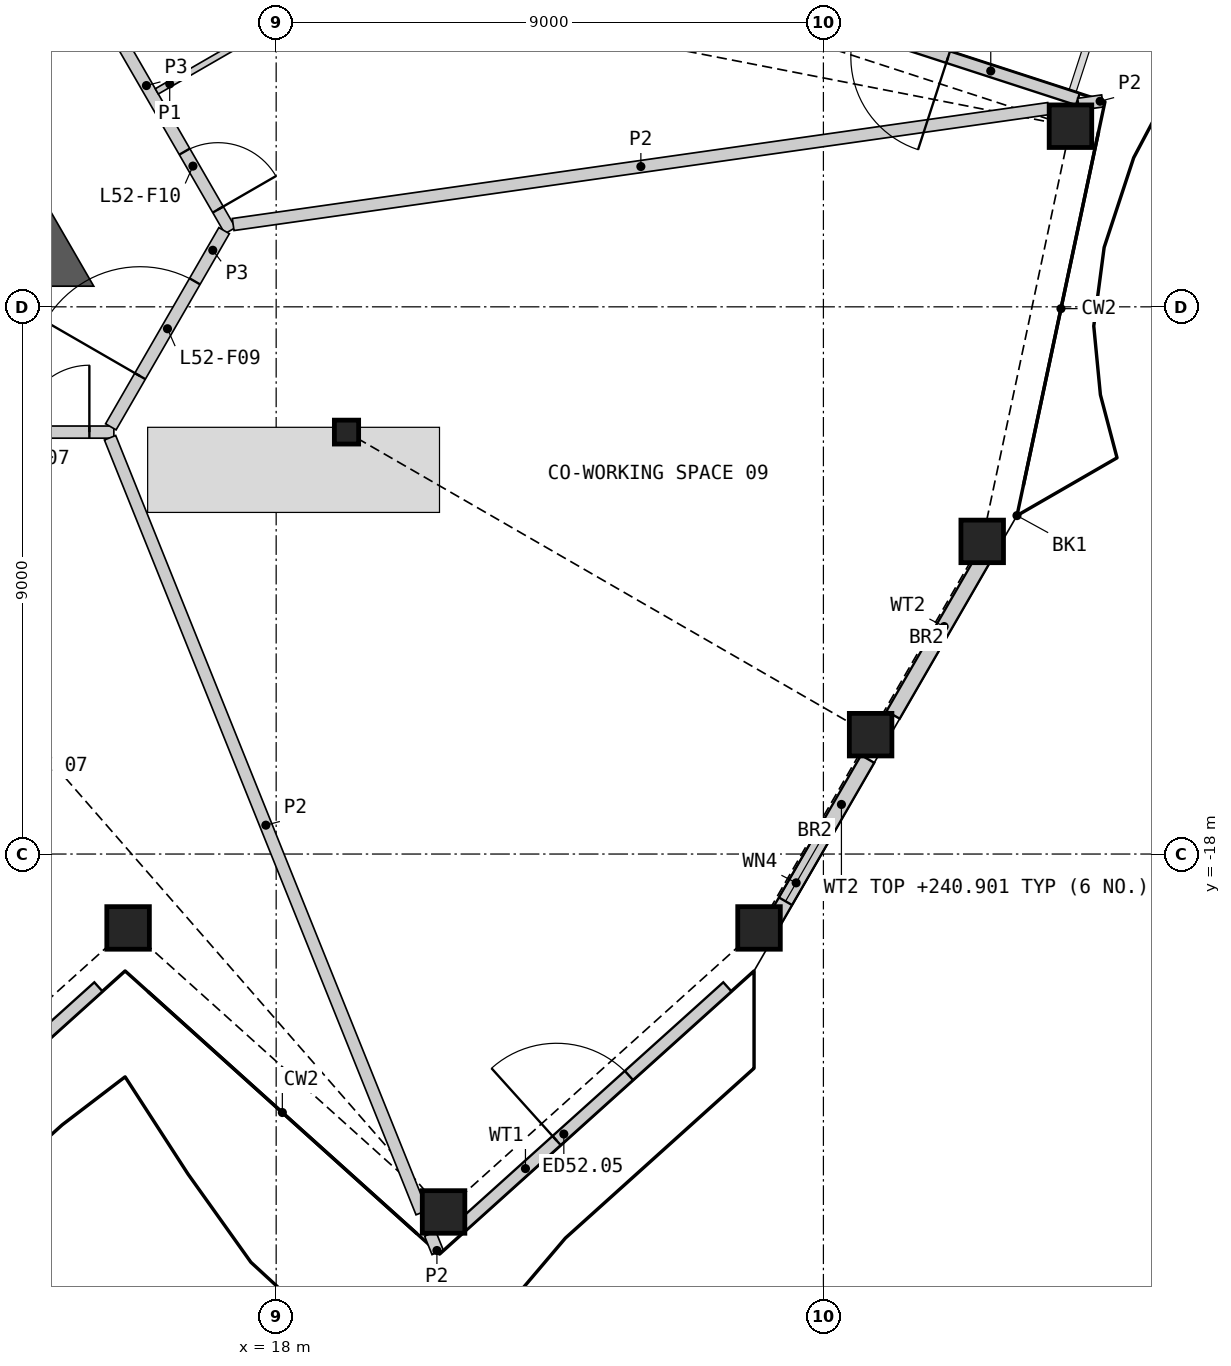
"""IFC4 building model, lengths in metres.
Left out: names, types, materials, properties, quantities, classifications, styles, units other than length and angle.
Written with IfcOpenShell. Run it as: python <this file> out.ifc"""

import sys

from ifc_helpers import new_model, si_unit, direction, frame, frame_2d, origin, origin_2d, place, context, subcontext, project, spatial, polyline, rectangle, hollow_rectangle, i_section, outline, extrude, element, fill, save


model = new_model("IFC4")
c1 = context("Model", 3, precision=1e-05, world=origin(), true_north=direction((0.0, 1.0)))
c2 = subcontext(c1, "Body", "Model", "MODEL_VIEW")
j1 = project(units=[si_unit("LENGTHUNIT", "METRE"), si_unit("PLANEANGLEUNIT", "RADIAN")], contexts=[c1])
p1 = place(None, origin())
s1 = spatial("IfcSite", under=j1, at=p1, CompositionType="ELEMENT")
p2 = place(p1, origin())
s2 = spatial("IfcBuilding", under=s1, at=p2, CompositionType="ELEMENT")
p3 = place(p2, frame((0.0, 0.0, 238.2)))
s3 = spatial("IfcBuildingStorey", under=s2, at=p3, CompositionType="ELEMENT", Elevation=238.2)
for number, where, z_axis, x_axis in (
    (1, (15.565, -19.215, 0.0), (0.0, 0.0, 1.0), (1.0, 0.0, 0.0)),
    (2, (20.753, -23.887, 0.0), (0.0, 0.0, 1.0), (1.0, 0.0, 0.0)),
    (3, (25.941, -19.215, 0.0), (0.0, 0.0, 1.0), (1.0, 0.0, 0.0)),
    (4, (27.776, -16.037, 0.0), (0.0, 0.0, 1.0), (1.0, 0.0, 0.0)),
    (5, (29.612, -12.858, 0.0), (0.0, 0.0, 1.0), (1.0, 0.0, 0.0)),
    (6, (31.063, -6.029, 0.0), (0.0, 0.0, 1.0), (1.0, 0.0, 0.0)),
):
    element("IfcColumn", number, at=place(p3, frame(where, z_axis=z_axis, x_axis=x_axis)), inside=s3, PredefinedType="COLUMN", context=c2, shape_type="SweptSolid", body=[
        extrude(hollow_rectangle(XDim=0.7, YDim=0.7, WallThickness=0.045, at=origin_2d()), origin(), (0.0, 0.0, 1.0), 3.6),
    ])
p4 = place(p3, frame((19.157, -11.06, 0.0), z_axis=(0.0, 0.0, 1.0), x_axis=(1.0, 0.0, 0.0)))
e7 = element("IfcColumn", 7, at=p4, inside=s3, PredefinedType="COLUMN", context=c2, shape_type="SweptSolid", body=[
    extrude(i_section(OverallWidth=0.399, OverallDepth=0.393, WebThickness=0.023, FlangeThickness=0.037, at=origin_2d()), origin(), (0.0, 0.0, 1.0), 3.6),
])
p5 = place(p3, frame((10.649, -24.17, 0.0), z_axis=(0.0, 0.0, 1.0), x_axis=(0.743143336638, 0.669132259878, 0.0)))
e8 = element("IfcWall", 8, at=p5, inside=s3, PredefinedType="SOLIDWALL", context=c2, shape_type="SweptSolid", body=[
    extrude(rectangle(XDim=5.958, YDim=0.2, at=frame_2d((2.979, 0.0))), origin(), (0.0, 0.0, 1.0), 2.701),
])
p6 = place(p5, frame((2.179, 0.0, 0.0)))
e9 = element("IfcOpeningElement", 9, at=p6, cuts=e8, PredefinedType="OPENING", context=c2, shape_type="SweptSolid", body=[
    extrude(rectangle(XDim=1.6, YDim=2.4, at=frame_2d((0.8, 1.2))), frame((0.0, 0.11, 0.0), z_axis=(0.0, -1.0, 0.0), x_axis=(1.0, 0.0, 0.0)), (0.0, 0.0, 1.0), 0.22),
])
p7 = place(p3, frame((20.993, -24.17, 0.0), z_axis=(0.0, 0.0, 1.0), x_axis=(0.743143336638, 0.669132259878, 0.0)))
e10 = element("IfcWall", 10, at=p7, inside=s3, PredefinedType="SOLIDWALL", context=c2, shape_type="SweptSolid", body=[
    extrude(rectangle(XDim=5.958, YDim=0.2, at=frame_2d((2.979, 0.0))), origin(), (0.0, 0.0, 1.0), 2.701),
])
p8 = place(p7, frame((2.179, 0.0, 0.0)))
e11 = element("IfcOpeningElement", 11, at=p8, cuts=e10, PredefinedType="OPENING", context=c2, shape_type="SweptSolid", body=[
    extrude(rectangle(XDim=1.6, YDim=2.4, at=frame_2d((0.8, 1.2))), frame((0.0, 0.11, 0.0), z_axis=(0.0, -1.0, 0.0), x_axis=(1.0, 0.0, 0.0)), (0.0, 0.0, 1.0), 0.22),
])
p9 = place(p3, frame((26.002, -19.427, 0.0), z_axis=(0.0, 0.0, 1.0), x_axis=(0.499987726745, 0.866032489635, 0.0)))
e12 = element("IfcWall", 12, at=p9, inside=s3, PredefinedType="SOLIDWALL", context=c2, shape_type="SweptSolid", body=[
    extrude(rectangle(XDim=3.452, YDim=0.25, at=frame_2d((1.726, 0.0))), origin(), (0.0, 0.0, 1.0), 2.701),
])
p10 = place(p9, frame((0.75, 0.0, 1.8)))
e13 = element("IfcOpeningElement", 13, at=p10, cuts=e12, PredefinedType="OPENING", context=c2, shape_type="SweptSolid", body=[
    extrude(rectangle(XDim=1.4, YDim=0.7, at=frame_2d((0.7, 0.35))), frame((0.0, 0.135, 0.0), z_axis=(0.0, -1.0, 0.0), x_axis=(1.0, 0.0, 0.0)), (0.0, 0.0, 1.0), 0.27),
])
p11 = place(p3, frame((28.146, -15.712, 0.0), z_axis=(0.0, 0.0, 1.0), x_axis=(0.500003693016, 0.86602327161, 0.0)))
e14 = element("IfcWall", 14, at=p11, inside=s3, PredefinedType="SOLIDWALL", context=c2, shape_type="SweptSolid", body=[
    extrude(rectangle(XDim=3.356, YDim=0.25, at=frame_2d((1.678, 0.0))), origin(), (0.0, 0.0, 1.0), 2.701),
])
p12 = place(p3, frame((31.184, -5.586, 0.0), z_axis=(0.0, 0.0, 1.0), x_axis=(-0.95106415783, 0.30899347516, 0.0)))
e15 = element("IfcWall", 15, at=p12, inside=s3, PredefinedType="SOLIDWALL", context=c2, shape_type="SweptSolid", body=[
    extrude(rectangle(XDim=6.021, YDim=0.2, at=frame_2d((3.011, 0.0))), origin(), (0.0, 0.0, 1.0), 2.701),
])
p13 = place(p12, frame((2.243, 0.0, 0.0)))
e16 = element("IfcOpeningElement", 16, at=p13, cuts=e15, PredefinedType="OPENING", context=c2, shape_type="SweptSolid", body=[
    extrude(rectangle(XDim=1.6, YDim=2.4, at=frame_2d((0.8, 1.2))), frame((0.0, 0.11, 0.0), z_axis=(0.0, -1.0, 0.0), x_axis=(1.0, 0.0, 0.0)), (0.0, 0.0, 1.0), 0.22),
])
p14 = place(p3, origin())
e17 = element("IfcWall", 17, at=p14, inside=s3, PredefinedType="SHEAR", context=c2, shape_type="SweptSolid", body=[
    extrude(outline(polyline([(12.748, -8.66), (12.748, -7.36), (13.874, -6.71), (15.0, -8.66), (12.748, -8.66)])), origin(), (0.0, 0.0, 1.0), 3.25),
])
p15 = place(p3, frame((9.788, -11.06, 0.0), z_axis=(0.0, 0.0, 1.0), x_axis=(1.0, 0.0, 0.0)))
e18 = element("IfcWall", 18, at=p15, inside=s3, PredefinedType="PARTITIONING", context=c2, shape_type="SweptSolid", body=[
    extrude(rectangle(XDim=5.543, YDim=0.2, at=frame_2d((2.771, 0.0))), origin(), (0.0, 0.0, 1.0), 3.25),
])
p16 = place(p15, frame((4.04, 0.0, 0.0)))
e19 = element("IfcOpeningElement", 19, at=p16, cuts=e18, PredefinedType="OPENING", context=c2, shape_type="SweptSolid", body=[
    extrude(rectangle(XDim=1.1, YDim=2.1, at=frame_2d((0.55, 1.05))), frame((0.0, 0.11, 0.0), z_axis=(0.0, -1.0, 0.0), x_axis=(1.0, 0.0, 0.0)), (0.0, 0.0, 1.0), 0.22),
])
p17 = place(p3, frame((14.489, -2.975, 0.0), z_axis=(0.0, 0.0, 1.0), x_axis=(0.500017753321, -0.866015153657, 0.0)))
e20 = element("IfcWall", 20, at=p17, inside=s3, PredefinedType="PARTITIONING", context=c2, shape_type="SweptSolid", body=[
    extrude(rectangle(XDim=5.51, YDim=0.2, at=frame_2d((2.755, 0.0))), origin(), (0.0, 0.0, 1.0), 3.25),
])
p18 = place(p17, frame((4.01, 0.0, 0.0)))
e21 = element("IfcOpeningElement", 21, at=p18, cuts=e20, PredefinedType="OPENING", context=c2, shape_type="SweptSolid", body=[
    extrude(rectangle(XDim=1.1, YDim=2.1, at=frame_2d((0.55, 1.05))), frame((0.0, 0.11, 0.0), z_axis=(0.0, -1.0, 0.0), x_axis=(1.0, 0.0, 0.0)), (0.0, 0.0, 1.0), 0.22),
])
p19 = place(p3, frame((15.281, -10.974, 0.0), z_axis=(0.0, 0.0, 1.0), x_axis=(0.499958791762, 0.866049194065, 0.0)))
e22 = element("IfcWall", 22, at=p19, inside=s3, PredefinedType="PARTITIONING", context=c2, shape_type="SweptSolid", body=[
    extrude(rectangle(XDim=3.726, YDim=0.2, at=frame_2d((1.863, 0.0))), origin(), (0.0, 0.0, 1.0), 3.25),
])
p20 = place(p19, frame((0.963, 0.0, 0.0)))
e23 = element("IfcOpeningElement", 23, at=p20, cuts=e22, PredefinedType="OPENING", context=c2, shape_type="SweptSolid", body=[
    extrude(rectangle(XDim=1.8, YDim=2.1, at=frame_2d((0.9, 1.05))), frame((0.0, 0.11, 0.0), z_axis=(0.0, -1.0, 0.0), x_axis=(1.0, 0.0, 0.0)), (0.0, 0.0, 1.0), 0.22),
])
p21 = place(p3, frame((15.268, -11.153, 0.0), z_axis=(0.0, 0.0, 1.0), x_axis=(0.373096979113, -0.927792349708, 0.0)))
e24 = element("IfcWall", 24, at=p21, inside=s3, PredefinedType="PARTITIONING", context=c2, shape_type="SweptSolid", body=[
    extrude(rectangle(XDim=13.736, YDim=0.2, at=frame_2d((6.868, 0.0))), origin(), (0.0, 0.0, 1.0), 2.404),
])
p22 = place(p3, frame((17.293, -7.646, 0.0), z_axis=(0.0, 0.0, 1.0), x_axis=(0.990042285303, 0.140770285614, 0.0)))
e25 = element("IfcWall", 25, at=p22, inside=s3, PredefinedType="PARTITIONING", context=c2, shape_type="SweptSolid", body=[
    extrude(rectangle(XDim=13.545, YDim=0.2, at=frame_2d((6.772, 0.0))), origin(), (0.0, 0.0, 1.0), 2.404),
])
p23 = place(p3, frame((31.196, -5.669, 0.0), z_axis=(0.0, 0.0, 1.0), x_axis=(0.990010701632, 0.140992236146, 0.0)))
e26 = element("IfcWall", 26, at=p23, inside=s3, PredefinedType="PARTITIONING", context=c2, shape_type="SweptSolid", body=[
    extrude(rectangle(XDim=0.398, YDim=0.2, at=frame_2d((0.199, 0.0))), origin(), (0.0, 0.0, 1.0), 2.404),
])
p24 = place(p3, frame((20.534, -24.247, 0.0), z_axis=(0.0, 0.0, 1.0), x_axis=(0.372801499492, -0.927911117498, 0.0)))
e27 = element("IfcWall", 27, at=p24, inside=s3, PredefinedType="PARTITIONING", context=c2, shape_type="SweptSolid", body=[
    extrude(rectangle(XDim=0.328, YDim=0.2, at=frame_2d((0.164, 0.0))), origin(), (0.0, 0.0, 1.0), 2.404),
])
p25 = place(p3, frame((16.037, -5.456, 0.0), z_axis=(0.0, 0.0, 1.0), x_axis=(0.865989751695, 0.500061746146, 0.0)))
e28 = element("IfcWall", 28, at=p25, inside=s3, PredefinedType="PARTITIONING", context=c2, shape_type="SweptSolid", body=[
    extrude(rectangle(XDim=2.45, YDim=0.1, at=frame_2d((1.225, 0.0))), origin(), (0.0, 0.0, 1.0), 2.404),
])
p26 = place(p8, origin())
e29 = element("IfcDoor", 29, at=p26, inside=s3, OperationType="DOUBLE_DOOR_SINGLE_SWING", PredefinedType="DOOR", context=c2, shape_type="SweptSolid", body=[
    extrude(rectangle(XDim=1.6, YDim=2.4, at=frame_2d((0.8, 1.2))), frame((0.0, 0.025, 0.0), z_axis=(0.0, -1.0, 0.0), x_axis=(1.0, 0.0, 0.0)), (0.0, 0.0, 1.0), 0.05),
])
fill(e11, e29)
p27 = place(p10, origin())
e30 = element("IfcWindow", 30, at=p27, inside=s3, PartitioningType="SINGLE_PANEL", PredefinedType="WINDOW", context=c2, shape_type="SweptSolid", body=[
    extrude(rectangle(XDim=1.4, YDim=0.7, at=frame_2d((0.7, 0.35))), frame((0.0, 0.03, 0.0), z_axis=(0.0, -1.0, 0.0), x_axis=(1.0, 0.0, 0.0)), (0.0, 0.0, 1.0), 0.06),
])
fill(e13, e30)
p28 = place(p13, origin())
e31 = element("IfcDoor", 31, at=p28, inside=s3, OperationType="DOUBLE_DOOR_SINGLE_SWING", PredefinedType="DOOR", context=c2, shape_type="SweptSolid", body=[
    extrude(rectangle(XDim=1.6, YDim=2.4, at=frame_2d((0.8, 1.2))), frame((0.0, 0.025, 0.0), z_axis=(0.0, -1.0, 0.0), x_axis=(1.0, 0.0, 0.0)), (0.0, 0.0, 1.0), 0.05),
])
fill(e16, e31)
p29 = place(p16, origin())
e32 = element("IfcDoor", 32, at=p29, inside=s3, OperationType="SINGLE_SWING_RIGHT", PredefinedType="DOOR", context=c2, shape_type="SweptSolid", body=[
    extrude(rectangle(XDim=1.1, YDim=2.1, at=frame_2d((0.55, 1.05))), frame((0.0, 0.025, 0.0), z_axis=(0.0, -1.0, 0.0), x_axis=(1.0, 0.0, 0.0)), (0.0, 0.0, 1.0), 0.05),
])
fill(e19, e32)
p30 = place(p20, origin())
e33 = element("IfcDoor", 33, at=p30, inside=s3, OperationType="DOUBLE_DOOR_SINGLE_SWING", PredefinedType="DOOR", context=c2, shape_type="SweptSolid", body=[
    extrude(rectangle(XDim=1.8, YDim=2.1, at=frame_2d((0.9, 1.05))), frame((0.0, 0.025, 0.0), z_axis=(0.0, -1.0, 0.0), x_axis=(1.0, 0.0, 0.0)), (0.0, 0.0, 1.0), 0.05),
])
fill(e23, e33)
p31 = place(p18, origin())
e34 = element("IfcDoor", 34, at=p31, inside=s3, OperationType="SINGLE_SWING_RIGHT", PredefinedType="DOOR", context=c2, shape_type="SweptSolid", body=[
    extrude(rectangle(XDim=1.1, YDim=2.1, at=frame_2d((0.55, 1.05))), frame((0.0, 0.025, 0.0), z_axis=(0.0, -1.0, 0.0), x_axis=(1.0, 0.0, 0.0)), (0.0, 0.0, 1.0), 0.05),
])
fill(e21, e34)
save(model, sys.argv[1])
